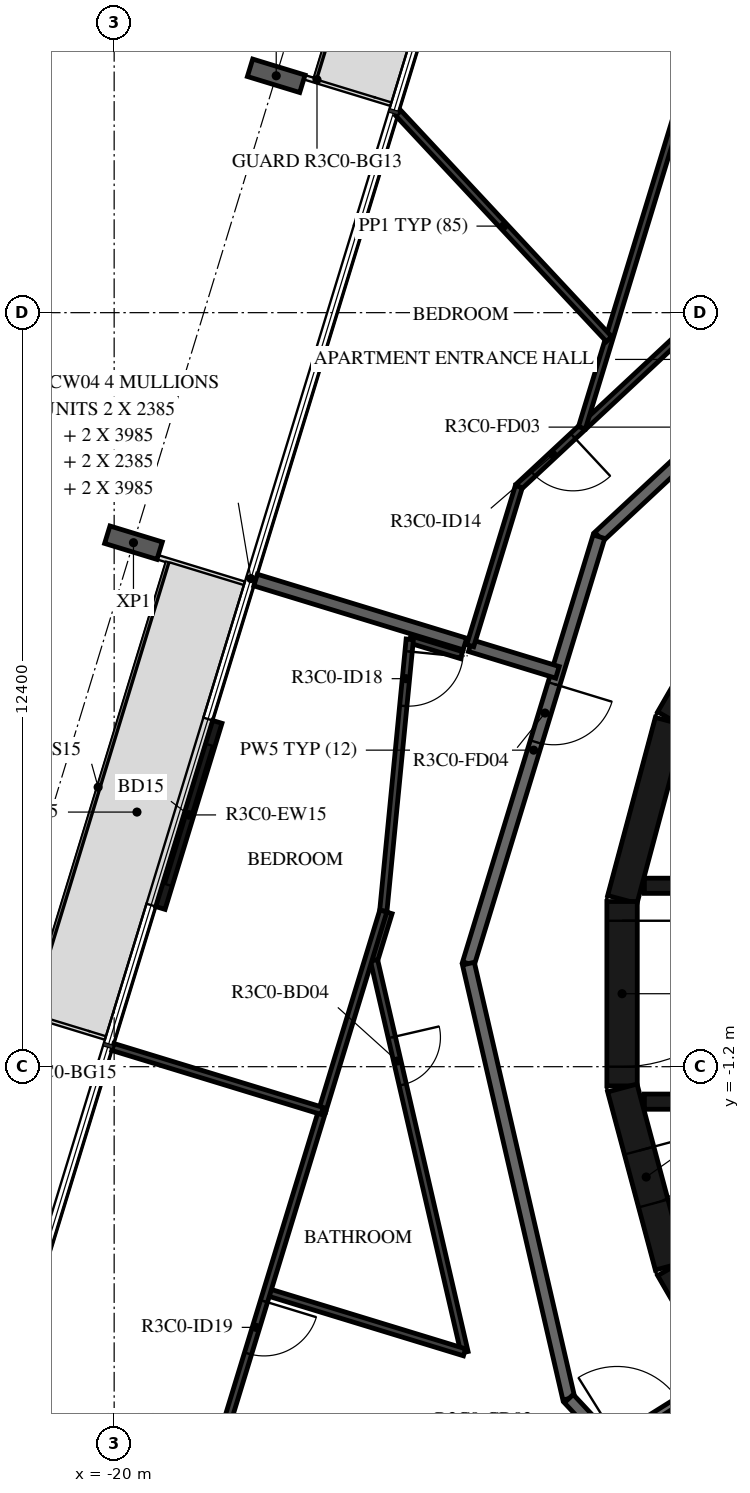
"""IFC4 building model, lengths in metres.
Left out: names, types, materials, properties, quantities, classifications, styles, units other than length and angle.
Written with IfcOpenShell. Run it as: python <this file> out.ifc"""

import sys

from ifc_helpers import new_model, si_unit, direction, frame, frame_2d, origin, origin_2d, place, context, subcontext, project, spatial, rectangle, i_section, extrude, element, fill, save


model = new_model("IFC4")
c1 = context("Model", 3, precision=1e-05, world=origin(), true_north=direction((0.0, 1.0)))
c2 = subcontext(c1, "Body", "Model", "MODEL_VIEW")
j1 = project(units=[si_unit("LENGTHUNIT", "METRE"), si_unit("PLANEANGLEUNIT", "RADIAN")], contexts=[c1])
p1 = place(None, origin())
s1 = spatial("IfcSite", under=j1, at=p1, CompositionType="ELEMENT")
p2 = place(p1, origin())
s2 = spatial("IfcBuilding", under=s1, at=p2, CompositionType="ELEMENT")
p3 = place(p2, frame((0.0, 0.0, 141.4)))
s3 = spatial("IfcBuildingStorey", under=s2, at=p3, CompositionType="ELEMENT", Elevation=141.4)
for number, where, z_axis, x_axis in (
    (1, (-17.335, 15.095, -0.38), (0.0, 0.0, 1.0), (0.292, 0.956, 0.0)),
    (2, (-19.682, 7.417, -0.38), (0.0, 0.0, 1.0), (0.292, 0.956, 0.0)),
):
    element("IfcColumn", number, at=place(p3, frame(where, z_axis=z_axis, x_axis=x_axis)), inside=s3, PredefinedType="COLUMN", context=c2, shape_type="SweptSolid", body=[
        extrude(i_section(OverallWidth=0.3, OverallDepth=0.9, WebThickness=0.019, FlangeThickness=0.035, FilletRadius=0.03, at=origin_2d()), origin(), (0.0, 0.0, 1.0), 2.616),
    ])
p4 = place(p3, frame((-18.304, 4.47, 0.0), z_axis=(0.0, 0.0, 1.0), x_axis=(-0.292348395078, -0.956311882126, 0.0)))
e3 = element("IfcWall", 3, at=p4, inside=s3, PredefinedType="STANDARD", context=c2, shape_type="SweptSolid", body=[
    extrude(rectangle(XDim=3.2, YDim=0.16, at=frame_2d((1.6, 0.0))), origin(), (0.0, 0.0, 1.0), 3.05),
])
p5 = place(p4, frame((0.4, 0.0, 0.0)))
e4 = element("IfcOpeningElement", 4, at=p5, cuts=e3, PredefinedType="OPENING", context=c2, shape_type="SweptSolid", body=[
    extrude(rectangle(XDim=2.4, YDim=2.4, at=frame_2d((1.2, 1.2))), frame((0.0, 0.09, 0.0), z_axis=(0.0, -1.0, 0.0), x_axis=(1.0, 0.0, 0.0)), (0.0, 0.0, 1.0), 0.18),
])
for number, where, z_axis, x_axis in (
    (5, (-9.329, 7.137, 0.0), (0.0, 0.0, 1.0), (-0.5, -0.866, 0.0)),
    (6, (-10.858, 4.479, 0.0), (0.0, 0.0, 1.0), (-0.259, -0.966, 0.0)),
):
    element("IfcWall", number, at=place(p3, frame(where, z_axis=z_axis, x_axis=x_axis)), inside=s3, PredefinedType="SHEAR", context=c2, shape_type="SweptSolid", body=[
        extrude(rectangle(XDim=3.033, YDim=0.5, at=frame_2d((1.516, 0.0))), origin(), (0.0, 0.0, 1.0), 3.05),
    ])
p6 = place(p3, frame((-11.647, 1.516, 0.0), z_axis=(0.0, 0.0, 1.0), x_axis=(0.0, -1.0, 0.0)))
e7 = element("IfcWall", 7, at=p6, inside=s3, PredefinedType="SHEAR", context=c2, shape_type="SweptSolid", body=[
    extrude(rectangle(XDim=3.033, YDim=0.5, at=frame_2d((1.516, 0.0))), origin(), (0.0, 0.0, 1.0), 3.05),
])
p7 = place(p6, frame((0.316, 0.0, 0.0)))
e8 = element("IfcOpeningElement", 8, at=p7, cuts=e7, PredefinedType="OPENING", context=c2, shape_type="SweptSolid", body=[
    extrude(rectangle(XDim=2.4, YDim=2.1, at=frame_2d((1.2, 1.05))), frame((0.0, 0.26, 0.0), z_axis=(0.0, -1.0, 0.0), x_axis=(1.0, 0.0, 0.0)), (0.0, 0.0, 1.0), 0.52),
])
p8 = place(p3, frame((-11.643, -1.55, 0.0), z_axis=(0.0, 0.0, 1.0), x_axis=(0.258734743916, -0.965948410781, 0.0)))
e9 = element("IfcWall", 9, at=p8, inside=s3, PredefinedType="SHEAR", context=c2, shape_type="SweptSolid", body=[
    extrude(rectangle(XDim=3.033, YDim=0.5, at=frame_2d((1.516, 0.0))), origin(), (0.0, 0.0, 1.0), 3.05),
])
p9 = place(p8, frame((1.066, 0.0, 0.0)))
e10 = element("IfcOpeningElement", 10, at=p9, cuts=e9, PredefinedType="OPENING", context=c2, shape_type="SweptSolid", body=[
    extrude(rectangle(XDim=0.9, YDim=2.1, at=frame_2d((0.45, 1.05))), frame((0.0, 0.26, 0.0), z_axis=(0.0, -1.0, 0.0), x_axis=(1.0, 0.0, 0.0)), (0.0, 0.0, 1.0), 0.52),
])
p10 = place(p3, frame((-10.845, -4.51, 0.0), z_axis=(0.0, 0.0, 1.0), x_axis=(0.500087131594, -0.865975092491, 0.0)))
e11 = element("IfcWall", 11, at=p10, inside=s3, PredefinedType="SHEAR", context=c2, shape_type="SweptSolid", body=[
    extrude(rectangle(XDim=3.033, YDim=0.5, at=frame_2d((1.516, 0.0))), origin(), (0.0, 0.0, 1.0), 3.05),
])
p11 = place(p3, frame((-11.28, 1.775, 0.0), z_axis=(0.0, 0.0, 1.0), x_axis=(1.0, 0.0, 0.0)))
e12 = element("IfcWall", 12, at=p11, inside=s3, PredefinedType="SHEAR", context=c2, shape_type="SweptSolid", body=[
    extrude(rectangle(XDim=14.38, YDim=0.25, at=frame_2d((7.19, 0.0))), origin(), (0.0, 0.0, 1.0), 3.05),
])
p12 = place(p11, frame((2.13, 0.0, 0.0)))
e13 = element("IfcOpeningElement", 13, at=p12, cuts=e12, PredefinedType="OPENING", context=c2, shape_type="SweptSolid", body=[
    extrude(rectangle(XDim=1.1, YDim=2.1, at=frame_2d((0.55, 1.05))), frame((0.0, 0.135, 0.0), z_axis=(0.0, -1.0, 0.0), x_axis=(1.0, 0.0, 0.0)), (0.0, 0.0, 1.0), 0.27),
])
p13 = place(p11, frame((4.28, 0.0, 0.0)))
e14 = element("IfcOpeningElement", 14, at=p13, cuts=e12, PredefinedType="OPENING", context=c2, shape_type="SweptSolid", body=[
    extrude(rectangle(XDim=1.1, YDim=2.1, at=frame_2d((0.55, 1.05))), frame((0.0, 0.135, 0.0), z_axis=(0.0, -1.0, 0.0), x_axis=(1.0, 0.0, 0.0)), (0.0, 0.0, 1.0), 0.27),
])
p14 = place(p11, frame((6.43, 0.0, 0.0)))
e15 = element("IfcOpeningElement", 15, at=p14, cuts=e12, PredefinedType="OPENING", context=c2, shape_type="SweptSolid", body=[
    extrude(rectangle(XDim=1.1, YDim=2.1, at=frame_2d((0.55, 1.05))), frame((0.0, 0.135, 0.0), z_axis=(0.0, -1.0, 0.0), x_axis=(1.0, 0.0, 0.0)), (0.0, 0.0, 1.0), 0.27),
])
p15 = place(p11, frame((8.58, 0.0, 0.0)))
e16 = element("IfcOpeningElement", 16, at=p15, cuts=e12, PredefinedType="OPENING", context=c2, shape_type="SweptSolid", body=[
    extrude(rectangle(XDim=1.1, YDim=2.1, at=frame_2d((0.55, 1.05))), frame((0.0, 0.135, 0.0), z_axis=(0.0, -1.0, 0.0), x_axis=(1.0, 0.0, 0.0)), (0.0, 0.0, 1.0), 0.27),
])
p16 = place(p11, frame((10.83, 0.0, 0.0)))
e17 = element("IfcOpeningElement", 17, at=p16, cuts=e12, PredefinedType="OPENING", context=c2, shape_type="SweptSolid", body=[
    extrude(rectangle(XDim=0.9, YDim=2.1, at=frame_2d((0.45, 1.05))), frame((0.0, 0.135, 0.0), z_axis=(0.0, -1.0, 0.0), x_axis=(1.0, 0.0, 0.0)), (0.0, 0.0, 1.0), 0.27),
])
p17 = place(p11, frame((12.98, 0.0, 0.0)))
e18 = element("IfcOpeningElement", 18, at=p17, cuts=e12, PredefinedType="OPENING", context=c2, shape_type="SweptSolid", body=[
    extrude(rectangle(XDim=0.9, YDim=2.1, at=frame_2d((0.45, 1.05))), frame((0.0, 0.135, 0.0), z_axis=(0.0, -1.0, 0.0), x_axis=(1.0, 0.0, 0.0)), (0.0, 0.0, 1.0), 0.27),
])
p18 = place(p3, frame((-11.28, -1.775, 0.0), z_axis=(0.0, 0.0, 1.0), x_axis=(1.0, 0.0, 0.0)))
e19 = element("IfcWall", 19, at=p18, inside=s3, PredefinedType="SHEAR", context=c2, shape_type="SweptSolid", body=[
    extrude(rectangle(XDim=14.38, YDim=0.25, at=frame_2d((7.19, 0.0))), origin(), (0.0, 0.0, 1.0), 3.05),
])
p19 = place(p18, frame((9.755, 0.0, 0.0)))
e20 = element("IfcOpeningElement", 20, at=p19, cuts=e19, PredefinedType="OPENING", context=c2, shape_type="SweptSolid", body=[
    extrude(rectangle(XDim=0.9, YDim=2.1, at=frame_2d((0.45, 1.05))), frame((0.0, 0.135, 0.0), z_axis=(0.0, -1.0, 0.0), x_axis=(1.0, 0.0, 0.0)), (0.0, 0.0, 1.0), 0.27),
])
p20 = place(p3, frame((-11.836, -7.396, 0.0), z_axis=(0.0, 0.0, 1.0), x_axis=(0.848071831599, 0.529881277692, 0.0)))
e21 = element("IfcWall", 21, at=p20, inside=s3, PredefinedType="PARTITIONING", context=c2, shape_type="SweptSolid", body=[
    extrude(rectangle(XDim=2.052, YDim=0.12, at=frame_2d((1.026, 0.0))), origin(), (0.0, 0.0, 1.0), 3.05),
])
p21 = place(p20, frame((0.125, 0.0, 0.0)))
e22 = element("IfcOpeningElement", 22, at=p21, cuts=e21, PredefinedType="OPENING", context=c2, shape_type="SweptSolid", body=[
    extrude(rectangle(XDim=1.2, YDim=2.1, at=frame_2d((0.6, 1.05))), frame((0.0, 0.07, 0.0), z_axis=(0.0, -1.0, 0.0), x_axis=(1.0, 0.0, 0.0)), (0.0, 0.0, 1.0), 0.14),
])
p22 = place(p3, frame((-6.659, 12.523, 0.0), z_axis=(0.0, 0.0, 1.0), x_axis=(-0.731350455479, -0.682001841105, 0.0)))
e23 = element("IfcWall", 23, at=p22, inside=s3, PredefinedType="STANDARD", context=c2, shape_type="SweptSolid", body=[
    extrude(rectangle(XDim=7.342, YDim=0.2, at=frame_2d((3.671, 0.0))), origin(), (0.0, 0.0, 1.0), 3.05),
])
p23 = place(p22, frame((4.2, 0.0, 0.0)))
e24 = element("IfcOpeningElement", 24, at=p23, cuts=e23, PredefinedType="OPENING", context=c2, shape_type="SweptSolid", body=[
    extrude(rectangle(XDim=1.0, YDim=2.1, at=frame_2d((0.5, 1.05))), frame((0.0, 0.11, 0.0), z_axis=(0.0, -1.0, 0.0), x_axis=(1.0, 0.0, 0.0)), (0.0, 0.0, 1.0), 0.22),
])
p24 = place(p3, frame((-12.028, 7.516, 0.0), z_axis=(0.0, 0.0, 1.0), x_axis=(-0.292365533182, -0.956306642771, 0.0)))
e25 = element("IfcWall", 25, at=p24, inside=s3, PredefinedType="STANDARD", context=c2, shape_type="SweptSolid", body=[
    extrude(rectangle(XDim=7.342, YDim=0.2, at=frame_2d((3.671, 0.0))), origin(), (0.0, 0.0, 1.0), 3.05),
])
p25 = place(p24, frame((2.533, 0.0, 0.0)))
e26 = element("IfcOpeningElement", 26, at=p25, cuts=e25, PredefinedType="OPENING", context=c2, shape_type="SweptSolid", body=[
    extrude(rectangle(XDim=1.0, YDim=2.1, at=frame_2d((0.5, 1.05))), frame((0.0, 0.11, 0.0), z_axis=(0.0, -1.0, 0.0), x_axis=(1.0, 0.0, 0.0)), (0.0, 0.0, 1.0), 0.22),
])
p26 = place(p3, frame((-14.175, 0.495, 0.0), z_axis=(0.0, 0.0, 1.0), x_axis=(0.224922649383, -0.974376622151, 0.0)))
e27 = element("IfcWall", 27, at=p26, inside=s3, PredefinedType="STANDARD", context=c2, shape_type="SweptSolid", body=[
    extrude(rectangle(XDim=7.342, YDim=0.2, at=frame_2d((3.671, 0.0))), origin(), (0.0, 0.0, 1.0), 3.05),
])
p27 = place(p3, frame((-12.523, -6.659, 0.0), z_axis=(0.0, 0.0, 1.0), x_axis=(0.682001841105, -0.731350455479, 0.0)))
e28 = element("IfcWall", 28, at=p27, inside=s3, PredefinedType="STANDARD", context=c2, shape_type="SweptSolid", body=[
    extrude(rectangle(XDim=7.342, YDim=0.2, at=frame_2d((3.671, 0.0))), origin(), (0.0, 0.0, 1.0), 3.05),
])
p28 = place(p3, frame((-14.145, 5.724, 0.0), z_axis=(0.0, 0.0, 1.0), x_axis=(0.956266872747, -0.292495586439, 0.0)))
e29 = element("IfcWall", 29, at=p28, inside=s3, PredefinedType="STANDARD", context=c2, shape_type="SweptSolid", body=[
    extrude(rectangle(XDim=1.5, YDim=0.2, at=frame_2d((0.75, 0.0))), origin(), (0.0, 0.0, 1.0), 3.05),
])
p29 = place(p3, frame((-17.674, 6.803, 0.0), z_axis=(0.0, 0.0, 1.0), x_axis=(0.956293645939, -0.292408041504, 0.0)))
e30 = element("IfcWall", 30, at=p29, inside=s3, PredefinedType="STANDARD", context=c2, shape_type="SweptSolid", body=[
    extrude(rectangle(XDim=3.6, YDim=0.2, at=frame_2d((1.8, 0.0))), origin(), (0.0, 0.0, 1.0), 3.05),
])
p30 = place(p3, frame((-7.388, 13.894, 0.0), z_axis=(0.0, 0.0, 1.0), x_axis=(-0.731357186721, -0.681994622729, 0.0)))
e31 = element("IfcWall", 31, at=p30, inside=s3, PredefinedType="PARTITIONING", context=c2, shape_type="SweptSolid", body=[
    extrude(rectangle(XDim=8.146, YDim=0.12, at=frame_2d((4.073, 0.0))), origin(), (0.0, 0.0, 1.0), 3.05),
])
p31 = place(p30, frame((0.725, 0.0, 0.0)))
e32 = element("IfcOpeningElement", 32, at=p31, cuts=e31, PredefinedType="OPENING", context=c2, shape_type="SweptSolid", body=[
    extrude(rectangle(XDim=0.8, YDim=2.1, at=frame_2d((0.4, 1.05))), frame((0.0, 0.07, 0.0), z_axis=(0.0, -1.0, 0.0), x_axis=(1.0, 0.0, 0.0)), (0.0, 0.0, 1.0), 0.14),
])
p32 = place(p30, frame((6.927, 0.0, 0.0)))
e33 = element("IfcOpeningElement", 33, at=p32, cuts=e31, PredefinedType="OPENING", context=c2, shape_type="SweptSolid", body=[
    extrude(rectangle(XDim=0.9, YDim=2.1, at=frame_2d((0.45, 1.05))), frame((0.0, 0.07, 0.0), z_axis=(0.0, -1.0, 0.0), x_axis=(1.0, 0.0, 0.0)), (0.0, 0.0, 1.0), 0.14),
])
p33 = place(p3, frame((-13.345, 8.339, 0.0), z_axis=(0.0, 0.0, 1.0), x_axis=(-0.292316072367, -0.956321762712, 0.0)))
e34 = element("IfcWall", 34, at=p33, inside=s3, PredefinedType="PARTITIONING", context=c2, shape_type="SweptSolid", body=[
    extrude(rectangle(XDim=2.734, YDim=0.12, at=frame_2d((1.367, 0.0))), origin(), (0.0, 0.0, 1.0), 3.05),
])
p34 = place(p3, frame((-8.417, 22.031, 0.0), z_axis=(0.0, 0.0, 1.0), x_axis=(-0.292371891841, -0.956304698755, 0.0)))
e35 = element("IfcWall", 35, at=p34, inside=s3, PredefinedType="PARTITIONING", context=c2, shape_type="SweptSolid", body=[
    extrude(rectangle(XDim=13.306, YDim=0.12, at=frame_2d((6.653, 0.0))), origin(), (0.0, 0.0, 1.0), 3.05),
])
p35 = place(p34, frame((2.777, 0.0, 0.0)))
e36 = element("IfcOpeningElement", 36, at=p35, cuts=e35, PredefinedType="OPENING", context=c2, shape_type="SweptSolid", body=[
    extrude(rectangle(XDim=0.9, YDim=2.1, at=frame_2d((0.45, 1.05))), frame((0.0, 0.07, 0.0), z_axis=(0.0, -1.0, 0.0), x_axis=(1.0, 0.0, 0.0)), (0.0, 0.0, 1.0), 0.14),
])
p36 = place(p3, frame((-15.327, 14.481, 0.0), z_axis=(0.0, 0.0, 1.0), x_axis=(0.68197575128, -0.731374783997, 0.0)))
e37 = element("IfcWall", 37, at=p36, inside=s3, PredefinedType="PARTITIONING", context=c2, shape_type="SweptSolid", body=[
    extrude(rectangle(XDim=5.081, YDim=0.12, at=frame_2d((2.54, 0.0))), origin(), (0.0, 0.0, 1.0), 3.05),
])
p37 = place(p3, frame((-14.287, 5.568, 0.0), z_axis=(0.0, 0.0, 1.0), x_axis=(-0.956287662261, 0.292427609859, 0.0)))
e38 = element("IfcWall", 38, at=p37, inside=s3, PredefinedType="PARTITIONING", context=c2, shape_type="SweptSolid", body=[
    extrude(rectangle(XDim=0.89, YDim=0.12, at=frame_2d((0.445, 0.0))), origin(), (0.0, 0.0, 1.0), 3.05),
])
p38 = place(p3, frame((-15.138, 5.828, 0.0), z_axis=(0.0, 0.0, 1.0), x_axis=(-0.096967255409, -0.995287572201, 0.0)))
e39 = element("IfcWall", 39, at=p38, inside=s3, PredefinedType="PARTITIONING", context=c2, shape_type="SweptSolid", body=[
    extrude(rectangle(XDim=4.489, YDim=0.12, at=frame_2d((2.245, 0.0))), origin(), (0.0, 0.0, 1.0), 3.05),
])
p39 = place(p38, frame((0.2, 0.0, 0.0)))
e40 = element("IfcOpeningElement", 40, at=p39, cuts=e39, PredefinedType="OPENING", context=c2, shape_type="SweptSolid", body=[
    extrude(rectangle(XDim=0.9, YDim=2.1, at=frame_2d((0.45, 1.05))), frame((0.0, 0.07, 0.0), z_axis=(0.0, -1.0, 0.0), x_axis=(1.0, 0.0, 0.0)), (0.0, 0.0, 1.0), 0.14),
])
p40 = place(p3, frame((-15.487, 1.333, 0.0), z_axis=(0.0, 0.0, 1.0), x_axis=(-0.2923698127, -0.956305334411, 0.0)))
e41 = element("IfcWall", 41, at=p40, inside=s3, PredefinedType="PARTITIONING", context=c2, shape_type="SweptSolid", body=[
    extrude(rectangle(XDim=0.82, YDim=0.12, at=frame_2d((0.41, 0.0))), origin(), (0.0, 0.0, 1.0), 3.05),
])
p41 = place(p3, frame((-15.727, 0.549, 0.0), z_axis=(0.0, 0.0, 1.0), x_axis=(0.224948441297, -0.974370668051, 0.0)))
e42 = element("IfcWall", 42, at=p41, inside=s3, PredefinedType="PARTITIONING", context=c2, shape_type="SweptSolid", body=[
    extrude(rectangle(XDim=6.616, YDim=0.12, at=frame_2d((3.308, 0.0))), origin(), (0.0, 0.0, 1.0), 3.05),
])
p42 = place(p41, frame((1.3, 0.0, 0.0)))
e43 = element("IfcOpeningElement", 43, at=p42, cuts=e42, PredefinedType="OPENING", context=c2, shape_type="SweptSolid", body=[
    extrude(rectangle(XDim=0.8, YDim=2.1, at=frame_2d((0.4, 1.05))), frame((0.0, 0.07, 0.0), z_axis=(0.0, -1.0, 0.0), x_axis=(1.0, 0.0, 0.0)), (0.0, 0.0, 1.0), 0.14),
])
p43 = place(p3, frame((-14.238, -5.897, 0.0), z_axis=(0.0, 0.0, 1.0), x_axis=(-0.956314762513, 0.292338972768, 0.0)))
e44 = element("IfcWall", 44, at=p43, inside=s3, PredefinedType="PARTITIONING", context=c2, shape_type="SweptSolid", body=[
    extrude(rectangle(XDim=3.399, YDim=0.12, at=frame_2d((1.699, 0.0))), origin(), (0.0, 0.0, 1.0), 3.05),
])
p44 = place(p3, frame((-16.579, -1.928, 0.0), z_axis=(0.0, 0.0, 1.0), x_axis=(-0.29236733738, -0.956306091183, 0.0)))
e45 = element("IfcWall", 45, at=p44, inside=s3, PredefinedType="PARTITIONING", context=c2, shape_type="SweptSolid", body=[
    extrude(rectangle(XDim=11.963, YDim=0.12, at=frame_2d((5.981, 0.0))), origin(), (0.0, 0.0, 1.0), 3.05),
])
p45 = place(p44, frame((3.271, 0.0, 0.0)))
e46 = element("IfcOpeningElement", 46, at=p45, cuts=e45, PredefinedType="OPENING", context=c2, shape_type="SweptSolid", body=[
    extrude(rectangle(XDim=0.9, YDim=2.1, at=frame_2d((0.45, 1.05))), frame((0.0, 0.07, 0.0), z_axis=(0.0, -1.0, 0.0), x_axis=(1.0, 0.0, 0.0)), (0.0, 0.0, 1.0), 0.14),
])
p46 = place(p3, frame((-16.579, -1.928, 0.0), z_axis=(0.0, 0.0, 1.0), x_axis=(0.292418780126, 0.956290362301, 0.0)))
e47 = element("IfcWall", 47, at=p46, inside=s3, PredefinedType="PARTITIONING", context=c2, shape_type="SweptSolid", body=[
    extrude(rectangle(XDim=3.438, YDim=0.12, at=frame_2d((1.719, 0.0))), origin(), (0.0, 0.0, 1.0), 3.05),
])
p47 = place(p3, frame((-20.022, -0.875, 0.0), z_axis=(0.0, 0.0, 1.0), x_axis=(0.956306810244, -0.292364985388, 0.0)))
e48 = element("IfcWall", 48, at=p47, inside=s3, PredefinedType="PARTITIONING", context=c2, shape_type="SweptSolid", body=[
    extrude(rectangle(XDim=3.6, YDim=0.12, at=frame_2d((1.8, 0.0))), origin(), (0.0, 0.0, 1.0), 3.05),
])
p48 = place(p5, origin())
e49 = element("IfcDoor", 49, at=p48, inside=s3, OperationType="DOUBLE_DOOR_SLIDING", PredefinedType="DOOR", context=c2, shape_type="SweptSolid", body=[
    extrude(rectangle(XDim=2.4, YDim=2.4, at=frame_2d((1.2, 1.2))), frame((0.0, 0.025, 0.0), z_axis=(0.0, -1.0, 0.0), x_axis=(1.0, 0.0, 0.0)), (0.0, 0.0, 1.0), 0.05),
])
fill(e4, e49)
p49 = place(p7, origin())
e50 = element("IfcDoor", 50, at=p49, inside=s3, OperationType="DOUBLE_DOOR_SINGLE_SWING", PredefinedType="DOOR", context=c2, shape_type="SweptSolid", body=[
    extrude(rectangle(XDim=2.4, YDim=2.1, at=frame_2d((1.2, 1.05))), frame((0.0, 0.025, 0.0), z_axis=(0.0, -1.0, 0.0), x_axis=(1.0, 0.0, 0.0)), (0.0, 0.0, 1.0), 0.05),
])
fill(e8, e50)
p50 = place(p9, origin())
e51 = element("IfcDoor", 51, at=p50, inside=s3, OperationType="SINGLE_SWING_RIGHT", PredefinedType="DOOR", context=c2, shape_type="SweptSolid", body=[
    extrude(rectangle(XDim=0.9, YDim=2.1, at=frame_2d((0.45, 1.05))), frame((0.0, 0.025, 0.0), z_axis=(0.0, -1.0, 0.0), x_axis=(1.0, 0.0, 0.0)), (0.0, 0.0, 1.0), 0.05),
])
fill(e10, e51)
p51 = place(p32, origin())
e52 = element("IfcDoor", 52, at=p51, inside=s3, OperationType="SINGLE_SWING_LEFT", PredefinedType="DOOR", context=c2, shape_type="SweptSolid", body=[
    extrude(rectangle(XDim=0.9, YDim=2.1, at=frame_2d((0.45, 1.05))), frame((0.0, 0.025, 0.0), z_axis=(0.0, -1.0, 0.0), x_axis=(1.0, 0.0, 0.0)), (0.0, 0.0, 1.0), 0.05),
])
fill(e33, e52)
p52 = place(p25, origin())
e53 = element("IfcDoor", 53, at=p52, inside=s3, OperationType="SINGLE_SWING_LEFT", PredefinedType="DOOR", context=c2, shape_type="SweptSolid", body=[
    extrude(rectangle(XDim=1.0, YDim=2.1, at=frame_2d((0.5, 1.05))), frame((0.0, 0.025, 0.0), z_axis=(0.0, -1.0, 0.0), x_axis=(1.0, 0.0, 0.0)), (0.0, 0.0, 1.0), 0.05),
])
fill(e26, e53)
p53 = place(p39, origin())
e54 = element("IfcDoor", 54, at=p53, inside=s3, OperationType="SINGLE_SWING_LEFT", PredefinedType="DOOR", context=c2, shape_type="SweptSolid", body=[
    extrude(rectangle(XDim=0.9, YDim=2.1, at=frame_2d((0.45, 1.05))), frame((0.0, 0.025, 0.0), z_axis=(0.0, -1.0, 0.0), x_axis=(1.0, 0.0, 0.0)), (0.0, 0.0, 1.0), 0.05),
])
fill(e40, e54)
p54 = place(p42, origin())
e55 = element("IfcDoor", 55, at=p54, inside=s3, OperationType="SINGLE_SWING_RIGHT", PredefinedType="DOOR", context=c2, shape_type="SweptSolid", body=[
    extrude(rectangle(XDim=0.8, YDim=2.1, at=frame_2d((0.4, 1.05))), frame((0.0, 0.025, 0.0), z_axis=(0.0, -1.0, 0.0), x_axis=(1.0, 0.0, 0.0)), (0.0, 0.0, 1.0), 0.05),
])
fill(e43, e55)
p55 = place(p45, origin())
e56 = element("IfcDoor", 56, at=p55, inside=s3, OperationType="SINGLE_SWING_RIGHT", PredefinedType="DOOR", context=c2, shape_type="SweptSolid", body=[
    extrude(rectangle(XDim=0.9, YDim=2.1, at=frame_2d((0.45, 1.05))), frame((0.0, 0.025, 0.0), z_axis=(0.0, -1.0, 0.0), x_axis=(1.0, 0.0, 0.0)), (0.0, 0.0, 1.0), 0.05),
])
fill(e46, e56)
p56 = place(p21, origin())
e57 = element("IfcDoor", 57, at=p56, inside=s3, OperationType="DOUBLE_DOOR_SINGLE_SWING", PredefinedType="DOOR", context=c2, shape_type="SweptSolid", body=[
    extrude(rectangle(XDim=1.2, YDim=2.1, at=frame_2d((0.6, 1.05))), frame((0.0, 0.025, 0.0), z_axis=(0.0, -1.0, 0.0), x_axis=(1.0, 0.0, 0.0)), (0.0, 0.0, 1.0), 0.05),
])
fill(e22, e57)
save(model, sys.argv[1])
